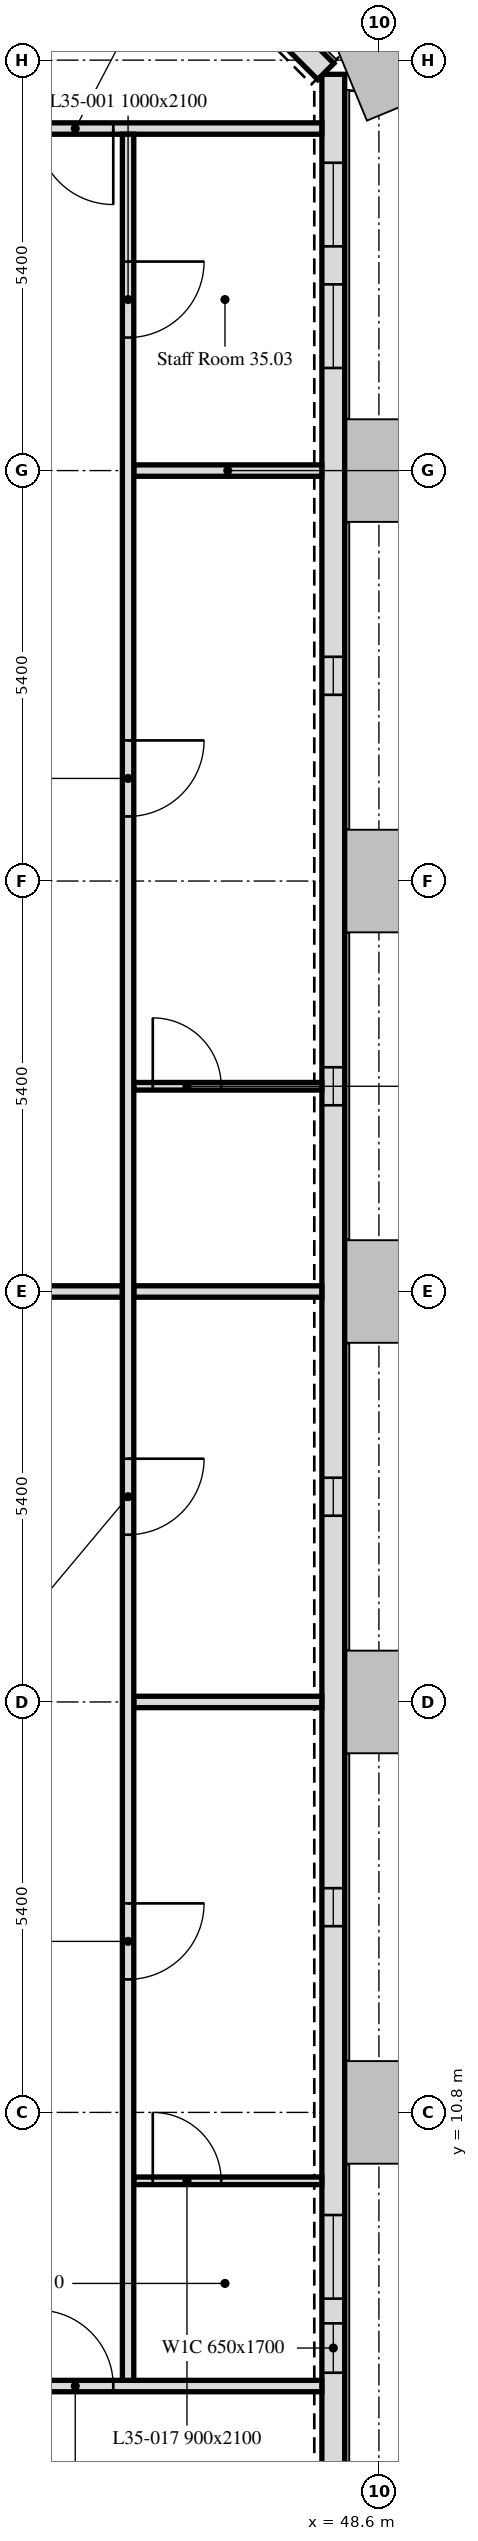
"""IFC4 building model, lengths in metres.
Left out: names, types, materials, properties, quantities, classifications, styles, units other than length and angle.
Written with IfcOpenShell. Run it as: python <this file> out.ifc"""

import sys

from ifc_helpers import new_model, si_unit, direction, frame, frame_2d, origin, place, context, subcontext, project, spatial, rectangle, extrude, element, fill, save


model = new_model("IFC4")
c1 = context("Model", 3, precision=1e-05, world=origin(), true_north=direction((0.0, 1.0)))
c2 = subcontext(c1, "Body", "Model", "MODEL_VIEW")
j1 = project(units=[si_unit("LENGTHUNIT", "METRE"), si_unit("PLANEANGLEUNIT", "RADIAN")], contexts=[c1])
p1 = place(None, origin())
s1 = spatial("IfcSite", under=j1, at=p1, CompositionType="ELEMENT")
p2 = place(p1, origin())
s2 = spatial("IfcBuilding", under=s1, at=p2, CompositionType="ELEMENT")
p3 = place(p2, frame((0.0, 0.0, 152.8)))
s3 = spatial("IfcBuildingStorey", under=s2, at=p3, CompositionType="ELEMENT", Elevation=152.8)
p4 = place(p3, frame((48.0, 5.586, 0.0), z_axis=(0.0, 0.0, 1.0), x_axis=(0.0, 1.0, 0.0)))
e1 = element("IfcWall", 1, at=p4, inside=s3, PredefinedType="SOLIDWALL", context=c2, shape_type="SweptSolid", body=[
    extrude(rectangle(XDim=32.027, YDim=0.3, at=frame_2d((16.014, 0.0))), origin(), (0.0, 0.0, 1.0), 3.0),
])
p5 = place(p4, frame((1.789, 0.0, 0.9)))
e2 = element("IfcOpeningElement", 2, at=p5, cuts=e1, PredefinedType="OPENING", context=c2, shape_type="SweptSolid", body=[
    extrude(rectangle(XDim=0.65, YDim=1.7, at=frame_2d((0.325, 0.85))), frame((0.0, 0.16, 0.0), z_axis=(0.0, -1.0, 0.0), x_axis=(1.0, 0.0, 0.0)), (0.0, 0.0, 1.0), 0.32),
])
p6 = place(p4, frame((2.764, 0.0, 0.9)))
e3 = element("IfcOpeningElement", 3, at=p6, cuts=e1, PredefinedType="OPENING", context=c2, shape_type="SweptSolid", body=[
    extrude(rectangle(XDim=1.1, YDim=1.7, at=frame_2d((0.55, 0.85))), frame((0.0, 0.16, 0.0), z_axis=(0.0, -1.0, 0.0), x_axis=(1.0, 0.0, 0.0)), (0.0, 0.0, 1.0), 0.32),
])
p7 = place(p4, frame((7.664, 0.0, 0.9)))
e4 = element("IfcOpeningElement", 4, at=p7, cuts=e1, PredefinedType="OPENING", context=c2, shape_type="SweptSolid", body=[
    extrude(rectangle(XDim=0.5, YDim=1.7, at=frame_2d((0.25, 0.85))), frame((0.0, 0.16, 0.0), z_axis=(0.0, -1.0, 0.0), x_axis=(1.0, 0.0, 0.0)), (0.0, 0.0, 1.0), 0.32),
])
p8 = place(p4, frame((13.064, 0.0, 0.9)))
e5 = element("IfcOpeningElement", 5, at=p8, cuts=e1, PredefinedType="OPENING", context=c2, shape_type="SweptSolid", body=[
    extrude(rectangle(XDim=0.5, YDim=1.7, at=frame_2d((0.25, 0.85))), frame((0.0, 0.16, 0.0), z_axis=(0.0, -1.0, 0.0), x_axis=(1.0, 0.0, 0.0)), (0.0, 0.0, 1.0), 0.32),
])
p9 = place(p4, frame((18.464, 0.0, 0.9)))
e6 = element("IfcOpeningElement", 6, at=p9, cuts=e1, PredefinedType="OPENING", context=c2, shape_type="SweptSolid", body=[
    extrude(rectangle(XDim=0.5, YDim=1.7, at=frame_2d((0.25, 0.85))), frame((0.0, 0.16, 0.0), z_axis=(0.0, -1.0, 0.0), x_axis=(1.0, 0.0, 0.0)), (0.0, 0.0, 1.0), 0.32),
])
p10 = place(p4, frame((23.864, 0.0, 0.9)))
e7 = element("IfcOpeningElement", 7, at=p10, cuts=e1, PredefinedType="OPENING", context=c2, shape_type="SweptSolid", body=[
    extrude(rectangle(XDim=0.5, YDim=1.7, at=frame_2d((0.25, 0.85))), frame((0.0, 0.16, 0.0), z_axis=(0.0, -1.0, 0.0), x_axis=(1.0, 0.0, 0.0)), (0.0, 0.0, 1.0), 0.32),
])
p11 = place(p4, frame((28.164, 0.0, 0.9)))
e8 = element("IfcOpeningElement", 8, at=p11, cuts=e1, PredefinedType="OPENING", context=c2, shape_type="SweptSolid", body=[
    extrude(rectangle(XDim=1.1, YDim=1.7, at=frame_2d((0.55, 0.85))), frame((0.0, 0.16, 0.0), z_axis=(0.0, -1.0, 0.0), x_axis=(1.0, 0.0, 0.0)), (0.0, 0.0, 1.0), 0.32),
])
p12 = place(p4, frame((29.764, 0.0, 0.9)))
e9 = element("IfcOpeningElement", 9, at=p12, cuts=e1, PredefinedType="OPENING", context=c2, shape_type="SweptSolid", body=[
    extrude(rectangle(XDim=1.1, YDim=1.7, at=frame_2d((0.55, 0.85))), frame((0.0, 0.16, 0.0), z_axis=(0.0, -1.0, 0.0), x_axis=(1.0, 0.0, 0.0)), (0.0, 0.0, 1.0), 0.32),
])
p13 = place(p3, frame((47.901, 37.65, 0.0), z_axis=(0.0, 0.0, 1.0), x_axis=(-0.707106781187, 0.707106781187, 0.0)))
e10 = element("IfcWall", 10, at=p13, inside=s3, PredefinedType="SOLIDWALL", context=c2, shape_type="SweptSolid", body=[
    extrude(rectangle(XDim=6.86, YDim=0.3, at=frame_2d((3.43, 0.0))), origin(), (0.0, 0.0, 1.0), 3.0),
])
p14 = place(p13, frame((1.73, 0.0, 0.9)))
e11 = element("IfcOpeningElement", 11, at=p14, cuts=e10, PredefinedType="OPENING", context=c2, shape_type="SweptSolid", body=[
    extrude(rectangle(XDim=3.4, YDim=1.7, at=frame_2d((1.7, 0.85))), frame((0.0, 0.16, 0.0), z_axis=(0.0, -1.0, 0.0), x_axis=(1.0, 0.0, 0.0)), (0.0, 0.0, 1.0), 0.32),
])
p15 = place(p3, frame((45.375, 32.4, 0.0), z_axis=(0.0, 0.0, 1.0), x_axis=(1.0, 0.0, 0.0)))
e12 = element("IfcWall", 12, at=p15, inside=s3, PredefinedType="PARTITIONING", context=c2, shape_type="SweptSolid", body=[
    extrude(rectangle(XDim=2.474, YDim=0.15, at=frame_2d((1.237, 0.0))), origin(), (0.0, 0.0, 1.0), 2.4),
])
p16 = place(p3, frame((47.849, 36.9, 0.0), z_axis=(0.0, 0.0, 1.0), x_axis=(-1.0, 0.0, 0.0)))
e13 = element("IfcWall", 13, at=p16, inside=s3, PredefinedType="PARTITIONING", context=c2, shape_type="SweptSolid", body=[
    extrude(rectangle(XDim=41.698, YDim=0.15, at=frame_2d((20.849, 0.0))), origin(), (0.0, 0.0, 1.0), 3.0),
])
p17 = place(p16, frame((27.649, 0.0, 0.0)))
e14 = element("IfcOpeningElement", 14, at=p17, cuts=e13, PredefinedType="OPENING", context=c2, shape_type="SweptSolid", body=[
    extrude(rectangle(XDim=1.0, YDim=2.1, at=frame_2d((0.5, 1.05))), frame((0.0, 0.075, 0.0), z_axis=(0.0, -1.0, 0.0), x_axis=(1.0, 0.0, 0.0)), (0.0, 0.0, 1.0), 0.15),
])
p18 = place(p16, frame((22.249, 0.0, 0.0)))
e15 = element("IfcOpeningElement", 15, at=p18, cuts=e13, PredefinedType="OPENING", context=c2, shape_type="SweptSolid", body=[
    extrude(rectangle(XDim=1.0, YDim=2.1, at=frame_2d((0.5, 1.05))), frame((0.0, 0.075, 0.0), z_axis=(0.0, -1.0, 0.0), x_axis=(1.0, 0.0, 0.0)), (0.0, 0.0, 1.0), 0.15),
])
p19 = place(p16, frame((16.849, 0.0, 0.0)))
e16 = element("IfcOpeningElement", 16, at=p19, cuts=e13, PredefinedType="OPENING", context=c2, shape_type="SweptSolid", body=[
    extrude(rectangle(XDim=1.0, YDim=2.1, at=frame_2d((0.5, 1.05))), frame((0.0, 0.075, 0.0), z_axis=(0.0, -1.0, 0.0), x_axis=(1.0, 0.0, 0.0)), (0.0, 0.0, 1.0), 0.15),
])
p20 = place(p16, frame((11.449, 0.0, 0.0)))
e17 = element("IfcOpeningElement", 17, at=p20, cuts=e13, PredefinedType="OPENING", context=c2, shape_type="SweptSolid", body=[
    extrude(rectangle(XDim=1.0, YDim=2.1, at=frame_2d((0.5, 1.05))), frame((0.0, 0.075, 0.0), z_axis=(0.0, -1.0, 0.0), x_axis=(1.0, 0.0, 0.0)), (0.0, 0.0, 1.0), 0.15),
])
p21 = place(p16, frame((2.744, 0.0, 0.0)))
e18 = element("IfcOpeningElement", 18, at=p21, cuts=e13, PredefinedType="OPENING", context=c2, shape_type="SweptSolid", body=[
    extrude(rectangle(XDim=1.0, YDim=2.1, at=frame_2d((0.5, 1.05))), frame((0.0, 0.075, 0.0), z_axis=(0.0, -1.0, 0.0), x_axis=(1.0, 0.0, 0.0)), (0.0, 0.0, 1.0), 0.15),
])
p22 = place(p16, frame((39.249, 0.0, 0.0)))
e19 = element("IfcOpeningElement", 19, at=p22, cuts=e13, PredefinedType="OPENING", context=c2, shape_type="SweptSolid", body=[
    extrude(rectangle(XDim=1.0, YDim=2.1, at=frame_2d((0.5, 1.05))), frame((0.0, 0.075, 0.0), z_axis=(0.0, -1.0, 0.0), x_axis=(1.0, 0.0, 0.0)), (0.0, 0.0, 1.0), 0.15),
])
p23 = place(p3, frame((45.375, 24.3, 0.0), z_axis=(0.0, 0.0, 1.0), x_axis=(1.0, 0.0, 0.0)))
e20 = element("IfcWall", 20, at=p23, inside=s3, PredefinedType="PARTITIONING", context=c2, shape_type="SweptSolid", body=[
    extrude(rectangle(XDim=2.474, YDim=0.1, at=frame_2d((1.237, 0.0))), origin(), (0.0, 0.0, 1.0), 3.0),
])
p24 = place(p23, frame((0.25, 0.0, 0.0)))
e21 = element("IfcOpeningElement", 21, at=p24, cuts=e20, PredefinedType="OPENING", context=c2, shape_type="SweptSolid", body=[
    extrude(rectangle(XDim=0.9, YDim=2.1, at=frame_2d((0.45, 1.05))), frame((0.0, 0.05, 0.0), z_axis=(0.0, -1.0, 0.0), x_axis=(1.0, 0.0, 0.0)), (0.0, 0.0, 1.0), 0.1),
])
p25 = place(p3, frame((45.375, 21.6, 0.0), z_axis=(0.0, 0.0, 1.0), x_axis=(1.0, 0.0, 0.0)))
e22 = element("IfcWall", 22, at=p25, inside=s3, PredefinedType="PARTITIONING", context=c2, shape_type="SweptSolid", body=[
    extrude(rectangle(XDim=2.474, YDim=0.15, at=frame_2d((1.237, 0.0))), origin(), (0.0, 0.0, 1.0), 2.4),
])
p26 = place(p3, frame((43.2, 21.6, 0.0), z_axis=(0.0, 0.0, 1.0), x_axis=(1.0, 0.0, 0.0)))
e23 = element("IfcWall", 23, at=p26, inside=s3, PredefinedType="PARTITIONING", context=c2, shape_type="SweptSolid", body=[
    extrude(rectangle(XDim=2.025, YDim=0.15, at=frame_2d((1.013, 0.0))), origin(), (0.0, 0.0, 1.0), 2.4),
])
p27 = place(p3, frame((45.375, 9.9, 0.0), z_axis=(0.0, 0.0, 1.0), x_axis=(1.0, 0.0, 0.0)))
e24 = element("IfcWall", 24, at=p27, inside=s3, PredefinedType="PARTITIONING", context=c2, shape_type="SweptSolid", body=[
    extrude(rectangle(XDim=2.474, YDim=0.1, at=frame_2d((1.237, 0.0))), origin(), (0.0, 0.0, 1.0), 3.0),
])
p28 = place(p27, frame((0.25, 0.0, 0.0)))
e25 = element("IfcOpeningElement", 25, at=p28, cuts=e24, PredefinedType="OPENING", context=c2, shape_type="SweptSolid", body=[
    extrude(rectangle(XDim=0.9, YDim=2.1, at=frame_2d((0.45, 1.05))), frame((0.0, 0.05, 0.0), z_axis=(0.0, -1.0, 0.0), x_axis=(1.0, 0.0, 0.0)), (0.0, 0.0, 1.0), 0.1),
])
p29 = place(p3, frame((47.849, 16.2, 0.0), z_axis=(0.0, 0.0, 1.0), x_axis=(-1.0, 0.0, 0.0)))
e26 = element("IfcWall", 26, at=p29, inside=s3, PredefinedType="PARTITIONING", context=c2, shape_type="SweptSolid", body=[
    extrude(rectangle(XDim=2.474, YDim=0.15, at=frame_2d((1.237, 0.0))), origin(), (0.0, 0.0, 1.0), 2.4),
])
p30 = place(p3, frame((6.151, 7.2, 0.0), z_axis=(0.0, 0.0, 1.0), x_axis=(1.0, 0.0, 0.0)))
e27 = element("IfcWall", 27, at=p30, inside=s3, PredefinedType="PARTITIONING", context=c2, shape_type="SweptSolid", body=[
    extrude(rectangle(XDim=41.698, YDim=0.15, at=frame_2d((20.849, 0.0))), origin(), (0.0, 0.0, 1.0), 2.4),
])
p31 = place(p30, frame((2.249, 0.0, 0.0)))
e28 = element("IfcOpeningElement", 28, at=p31, cuts=e27, PredefinedType="OPENING", context=c2, shape_type="SweptSolid", body=[
    extrude(rectangle(XDim=1.0, YDim=2.1, at=frame_2d((0.5, 1.05))), frame((0.0, 0.075, 0.0), z_axis=(0.0, -1.0, 0.0), x_axis=(1.0, 0.0, 0.0)), (0.0, 0.0, 1.0), 0.15),
])
p32 = place(p30, frame((7.649, 0.0, 0.0)))
e29 = element("IfcOpeningElement", 29, at=p32, cuts=e27, PredefinedType="OPENING", context=c2, shape_type="SweptSolid", body=[
    extrude(rectangle(XDim=1.0, YDim=2.1, at=frame_2d((0.5, 1.05))), frame((0.0, 0.075, 0.0), z_axis=(0.0, -1.0, 0.0), x_axis=(1.0, 0.0, 0.0)), (0.0, 0.0, 1.0), 0.15),
])
p33 = place(p30, frame((13.049, 0.0, 0.0)))
e30 = element("IfcOpeningElement", 30, at=p33, cuts=e27, PredefinedType="OPENING", context=c2, shape_type="SweptSolid", body=[
    extrude(rectangle(XDim=1.0, YDim=2.1, at=frame_2d((0.5, 1.05))), frame((0.0, 0.075, 0.0), z_axis=(0.0, -1.0, 0.0), x_axis=(1.0, 0.0, 0.0)), (0.0, 0.0, 1.0), 0.15),
])
p34 = place(p30, frame((18.449, 0.0, 0.0)))
e31 = element("IfcOpeningElement", 31, at=p34, cuts=e27, PredefinedType="OPENING", context=c2, shape_type="SweptSolid", body=[
    extrude(rectangle(XDim=1.0, YDim=2.1, at=frame_2d((0.5, 1.05))), frame((0.0, 0.075, 0.0), z_axis=(0.0, -1.0, 0.0), x_axis=(1.0, 0.0, 0.0)), (0.0, 0.0, 1.0), 0.15),
])
p35 = place(p30, frame((23.849, 0.0, 0.0)))
e32 = element("IfcOpeningElement", 32, at=p35, cuts=e27, PredefinedType="OPENING", context=c2, shape_type="SweptSolid", body=[
    extrude(rectangle(XDim=1.0, YDim=2.1, at=frame_2d((0.5, 1.05))), frame((0.0, 0.075, 0.0), z_axis=(0.0, -1.0, 0.0), x_axis=(1.0, 0.0, 0.0)), (0.0, 0.0, 1.0), 0.15),
])
p36 = place(p30, frame((29.249, 0.0, 0.0)))
e33 = element("IfcOpeningElement", 33, at=p36, cuts=e27, PredefinedType="OPENING", context=c2, shape_type="SweptSolid", body=[
    extrude(rectangle(XDim=1.0, YDim=2.1, at=frame_2d((0.5, 1.05))), frame((0.0, 0.075, 0.0), z_axis=(0.0, -1.0, 0.0), x_axis=(1.0, 0.0, 0.0)), (0.0, 0.0, 1.0), 0.15),
])
p37 = place(p30, frame((37.954, 0.0, 0.0)))
e34 = element("IfcOpeningElement", 34, at=p37, cuts=e27, PredefinedType="OPENING", context=c2, shape_type="SweptSolid", body=[
    extrude(rectangle(XDim=1.0, YDim=2.1, at=frame_2d((0.5, 1.05))), frame((0.0, 0.075, 0.0), z_axis=(0.0, -1.0, 0.0), x_axis=(1.0, 0.0, 0.0)), (0.0, 0.0, 1.0), 0.15),
])
p38 = place(p3, frame((45.3, 36.825, 0.0), z_axis=(0.0, 0.0, 1.0), x_axis=(0.0, -1.0, 0.0)))
e35 = element("IfcWall", 35, at=p38, inside=s3, PredefinedType="PARTITIONING", context=c2, shape_type="SweptSolid", body=[
    extrude(rectangle(XDim=29.55, YDim=0.15, at=frame_2d((14.775, 0.0))), origin(), (0.0, 0.0, 1.0), 2.4),
])
p39 = place(p38, frame((1.675, 0.0, 0.0)))
e36 = element("IfcOpeningElement", 36, at=p39, cuts=e35, PredefinedType="OPENING", context=c2, shape_type="SweptSolid", body=[
    extrude(rectangle(XDim=1.0, YDim=2.1, at=frame_2d((0.5, 1.05))), frame((0.0, 0.075, 0.0), z_axis=(0.0, -1.0, 0.0), x_axis=(1.0, 0.0, 0.0)), (0.0, 0.0, 1.0), 0.15),
])
p40 = place(p38, frame((17.425, 0.0, 0.0)))
e37 = element("IfcOpeningElement", 37, at=p40, cuts=e35, PredefinedType="OPENING", context=c2, shape_type="SweptSolid", body=[
    extrude(rectangle(XDim=1.0, YDim=2.1, at=frame_2d((0.5, 1.05))), frame((0.0, 0.075, 0.0), z_axis=(0.0, -1.0, 0.0), x_axis=(1.0, 0.0, 0.0)), (0.0, 0.0, 1.0), 0.15),
])
p41 = place(p38, frame((7.975, 0.0, 0.0)))
e38 = element("IfcOpeningElement", 38, at=p41, cuts=e35, PredefinedType="OPENING", context=c2, shape_type="SweptSolid", body=[
    extrude(rectangle(XDim=1.0, YDim=2.1, at=frame_2d((0.5, 1.05))), frame((0.0, 0.075, 0.0), z_axis=(0.0, -1.0, 0.0), x_axis=(1.0, 0.0, 0.0)), (0.0, 0.0, 1.0), 0.15),
])
p42 = place(p38, frame((23.275, 0.0, 0.0)))
e39 = element("IfcOpeningElement", 39, at=p42, cuts=e35, PredefinedType="OPENING", context=c2, shape_type="SweptSolid", body=[
    extrude(rectangle(XDim=1.0, YDim=2.1, at=frame_2d((0.5, 1.05))), frame((0.0, 0.075, 0.0), z_axis=(0.0, -1.0, 0.0), x_axis=(1.0, 0.0, 0.0)), (0.0, 0.0, 1.0), 0.15),
])
p43 = place(p5, origin())
e40 = element("IfcWindow", 40, at=p43, inside=s3, PartitioningType="SINGLE_PANEL", PredefinedType="WINDOW", context=c2, shape_type="SweptSolid", body=[
    extrude(rectangle(XDim=0.65, YDim=1.7, at=frame_2d((0.325, 0.85))), frame((0.0, 0.03, 0.0), z_axis=(0.0, -1.0, 0.0), x_axis=(1.0, 0.0, 0.0)), (0.0, 0.0, 1.0), 0.06),
])
fill(e2, e40)
p44 = place(p6, origin())
e41 = element("IfcWindow", 41, at=p44, inside=s3, PartitioningType="SINGLE_PANEL", PredefinedType="WINDOW", context=c2, shape_type="SweptSolid", body=[
    extrude(rectangle(XDim=1.1, YDim=1.7, at=frame_2d((0.55, 0.85))), frame((0.0, 0.03, 0.0), z_axis=(0.0, -1.0, 0.0), x_axis=(1.0, 0.0, 0.0)), (0.0, 0.0, 1.0), 0.06),
])
fill(e3, e41)
p45 = place(p7, origin())
e42 = element("IfcWindow", 42, at=p45, inside=s3, PartitioningType="SINGLE_PANEL", PredefinedType="WINDOW", context=c2, shape_type="SweptSolid", body=[
    extrude(rectangle(XDim=0.5, YDim=1.7, at=frame_2d((0.25, 0.85))), frame((0.0, 0.03, 0.0), z_axis=(0.0, -1.0, 0.0), x_axis=(1.0, 0.0, 0.0)), (0.0, 0.0, 1.0), 0.06),
])
fill(e4, e42)
p46 = place(p8, origin())
e43 = element("IfcWindow", 43, at=p46, inside=s3, PartitioningType="SINGLE_PANEL", PredefinedType="WINDOW", context=c2, shape_type="SweptSolid", body=[
    extrude(rectangle(XDim=0.5, YDim=1.7, at=frame_2d((0.25, 0.85))), frame((0.0, 0.03, 0.0), z_axis=(0.0, -1.0, 0.0), x_axis=(1.0, 0.0, 0.0)), (0.0, 0.0, 1.0), 0.06),
])
fill(e5, e43)
p47 = place(p9, origin())
e44 = element("IfcWindow", 44, at=p47, inside=s3, PartitioningType="SINGLE_PANEL", PredefinedType="WINDOW", context=c2, shape_type="SweptSolid", body=[
    extrude(rectangle(XDim=0.5, YDim=1.7, at=frame_2d((0.25, 0.85))), frame((0.0, 0.03, 0.0), z_axis=(0.0, -1.0, 0.0), x_axis=(1.0, 0.0, 0.0)), (0.0, 0.0, 1.0), 0.06),
])
fill(e6, e44)
p48 = place(p10, origin())
e45 = element("IfcWindow", 45, at=p48, inside=s3, PartitioningType="SINGLE_PANEL", PredefinedType="WINDOW", context=c2, shape_type="SweptSolid", body=[
    extrude(rectangle(XDim=0.5, YDim=1.7, at=frame_2d((0.25, 0.85))), frame((0.0, 0.03, 0.0), z_axis=(0.0, -1.0, 0.0), x_axis=(1.0, 0.0, 0.0)), (0.0, 0.0, 1.0), 0.06),
])
fill(e7, e45)
p49 = place(p11, origin())
e46 = element("IfcWindow", 46, at=p49, inside=s3, PartitioningType="SINGLE_PANEL", PredefinedType="WINDOW", context=c2, shape_type="SweptSolid", body=[
    extrude(rectangle(XDim=1.1, YDim=1.7, at=frame_2d((0.55, 0.85))), frame((0.0, 0.03, 0.0), z_axis=(0.0, -1.0, 0.0), x_axis=(1.0, 0.0, 0.0)), (0.0, 0.0, 1.0), 0.06),
])
fill(e8, e46)
p50 = place(p12, origin())
e47 = element("IfcWindow", 47, at=p50, inside=s3, PartitioningType="SINGLE_PANEL", PredefinedType="WINDOW", context=c2, shape_type="SweptSolid", body=[
    extrude(rectangle(XDim=1.1, YDim=1.7, at=frame_2d((0.55, 0.85))), frame((0.0, 0.03, 0.0), z_axis=(0.0, -1.0, 0.0), x_axis=(1.0, 0.0, 0.0)), (0.0, 0.0, 1.0), 0.06),
])
fill(e9, e47)
p51 = place(p39, origin())
e48 = element("IfcDoor", 48, at=p51, inside=s3, OperationType="SINGLE_SWING_LEFT", PredefinedType="DOOR", context=c2, shape_type="SweptSolid", body=[
    extrude(rectangle(XDim=1.0, YDim=2.1, at=frame_2d((0.5, 1.05))), frame((0.0, 0.025, 0.0), z_axis=(0.0, -1.0, 0.0), x_axis=(1.0, 0.0, 0.0)), (0.0, 0.0, 1.0), 0.05),
])
fill(e36, e48)
p52 = place(p24, origin())
e49 = element("IfcDoor", 49, at=p52, inside=s3, OperationType="SINGLE_SWING_RIGHT", PredefinedType="DOOR", context=c2, shape_type="SweptSolid", body=[
    extrude(rectangle(XDim=0.9, YDim=2.1, at=frame_2d((0.45, 1.05))), frame((0.0, 0.025, 0.0), z_axis=(0.0, -1.0, 0.0), x_axis=(1.0, 0.0, 0.0)), (0.0, 0.0, 1.0), 0.05),
])
fill(e21, e49)
p53 = place(p28, origin())
e50 = element("IfcDoor", 50, at=p53, inside=s3, OperationType="SINGLE_SWING_LEFT", PredefinedType="DOOR", context=c2, shape_type="SweptSolid", body=[
    extrude(rectangle(XDim=0.9, YDim=2.1, at=frame_2d((0.45, 1.05))), frame((0.0, 0.025, 0.0), z_axis=(0.0, -1.0, 0.0), x_axis=(1.0, 0.0, 0.0)), (0.0, 0.0, 1.0), 0.05),
])
fill(e25, e50)
p54 = place(p40, origin())
e51 = element("IfcDoor", 51, at=p54, inside=s3, OperationType="SINGLE_SWING_RIGHT", PredefinedType="DOOR", context=c2, shape_type="SweptSolid", body=[
    extrude(rectangle(XDim=1.0, YDim=2.1, at=frame_2d((0.5, 1.05))), frame((0.0, 0.025, 0.0), z_axis=(0.0, -1.0, 0.0), x_axis=(1.0, 0.0, 0.0)), (0.0, 0.0, 1.0), 0.05),
])
fill(e37, e51)
p55 = place(p21, origin())
e52 = element("IfcDoor", 52, at=p55, inside=s3, OperationType="SINGLE_SWING_LEFT", PredefinedType="DOOR", context=c2, shape_type="SweptSolid", body=[
    extrude(rectangle(XDim=1.0, YDim=2.1, at=frame_2d((0.5, 1.05))), frame((0.0, 0.025, 0.0), z_axis=(0.0, -1.0, 0.0), x_axis=(1.0, 0.0, 0.0)), (0.0, 0.0, 1.0), 0.05),
])
fill(e18, e52)
p56 = place(p41, origin())
e53 = element("IfcDoor", 53, at=p56, inside=s3, OperationType="SINGLE_SWING_RIGHT", PredefinedType="DOOR", context=c2, shape_type="SweptSolid", body=[
    extrude(rectangle(XDim=1.0, YDim=2.1, at=frame_2d((0.5, 1.05))), frame((0.0, 0.025, 0.0), z_axis=(0.0, -1.0, 0.0), x_axis=(1.0, 0.0, 0.0)), (0.0, 0.0, 1.0), 0.05),
])
fill(e38, e53)
p57 = place(p42, origin())
e54 = element("IfcDoor", 54, at=p57, inside=s3, OperationType="SINGLE_SWING_RIGHT", PredefinedType="DOOR", context=c2, shape_type="SweptSolid", body=[
    extrude(rectangle(XDim=1.0, YDim=2.1, at=frame_2d((0.5, 1.05))), frame((0.0, 0.025, 0.0), z_axis=(0.0, -1.0, 0.0), x_axis=(1.0, 0.0, 0.0)), (0.0, 0.0, 1.0), 0.05),
])
fill(e39, e54)
p58 = place(p37, origin())
e55 = element("IfcDoor", 55, at=p58, inside=s3, OperationType="SINGLE_SWING_LEFT", PredefinedType="DOOR", context=c2, shape_type="SweptSolid", body=[
    extrude(rectangle(XDim=1.0, YDim=2.1, at=frame_2d((0.5, 1.05))), frame((0.0, 0.025, 0.0), z_axis=(0.0, -1.0, 0.0), x_axis=(1.0, 0.0, 0.0)), (0.0, 0.0, 1.0), 0.05),
])
fill(e34, e55)
save(model, sys.argv[1])
